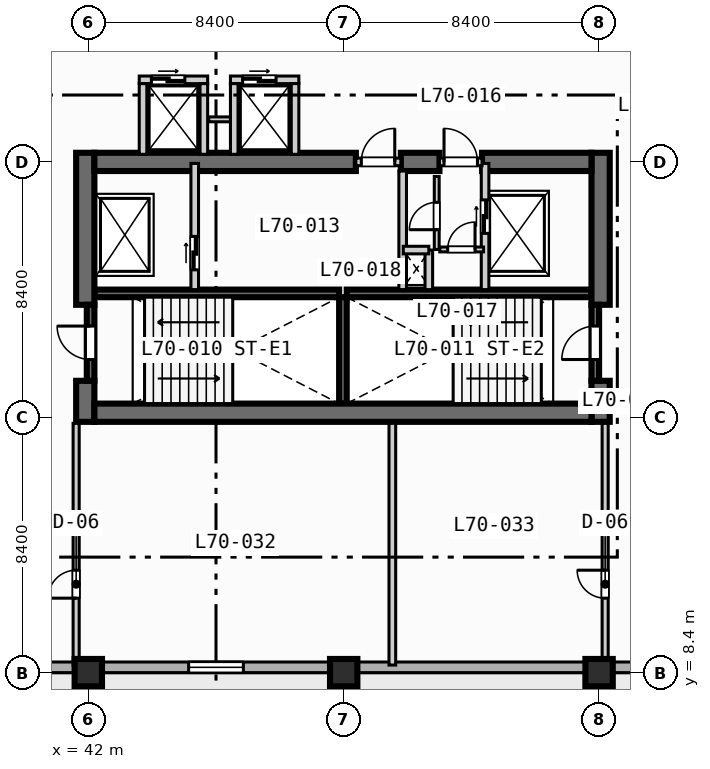
"""IFC4 building model, lengths in metres.
Left out: names, types, materials, properties, quantities, classifications, styles, units other than length and angle.
Written with IfcOpenShell. Run it as: python <this file> out.ifc"""

import sys

from ifc_helpers import new_model, si_unit, direction, frame, frame_2d, origin, origin_2d, place, context, subcontext, project, spatial, rectangle, extrude, element, fill, save


model = new_model("IFC4")
c1 = context("Model", 3, precision=1e-05, world=origin(), true_north=direction((0.0, 1.0)))
c2 = subcontext(c1, "Body", "Model", "MODEL_VIEW")
j1 = project(units=[si_unit("LENGTHUNIT", "METRE"), si_unit("PLANEANGLEUNIT", "RADIAN")], contexts=[c1])
p1 = place(None, origin())
s1 = spatial("IfcSite", under=j1, at=p1, CompositionType="ELEMENT")
p2 = place(p1, origin())
s2 = spatial("IfcBuilding", under=s1, at=p2, CompositionType="ELEMENT")
p3 = place(p2, frame((0.0, 0.0, 282.3)))
s3 = spatial("IfcBuildingStorey", under=s2, at=p3, CompositionType="ELEMENT", Elevation=282.3)
for number, where, z_axis, x_axis in (
    (1, (42.2, 20.875, 0.0), (0.0, 0.0, 1.0), (1.0, 0.0, 0.0)),
    (2, (50.5, 20.875, 0.0), (0.0, 0.0, 1.0), (1.0, 0.0, 0.0)),
):
    element("IfcWall", number, at=place(p3, frame(where, z_axis=z_axis, x_axis=x_axis)), inside=s3, PredefinedType="SOLIDWALL", context=c2, shape_type="SweptSolid", body=[
        extrude(rectangle(XDim=8.05, YDim=0.25, at=frame_2d((4.025, 0.0))), origin(), (0.0, 0.0, 1.0), 3.47),
    ])
p4 = place(p3, frame((50.375, 17.25, 0.0), z_axis=(0.0, 0.0, 1.0), x_axis=(0.0, 1.0, 0.0)))
e3 = element("IfcWall", 3, at=p4, inside=s3, PredefinedType="SOLIDWALL", context=c2, shape_type="SweptSolid", body=[
    extrude(rectangle(XDim=3.5, YDim=0.25, at=frame_2d((1.75, 0.0))), origin(), (0.0, 0.0, 1.0), 3.47),
])
p5 = place(p3, frame((41.9, 16.65, 0.0), z_axis=(0.0, 0.0, 1.0), x_axis=(0.0, 1.0, 0.0)))
e4 = element("IfcWall", 4, at=p5, inside=s3, PredefinedType="SHEAR", context=c2, shape_type="SweptSolid", body=[
    extrude(rectangle(XDim=1.35, YDim=0.6, at=frame_2d((0.675, 0.0))), origin(), (0.0, 0.0, 1.0), 3.47),
])
p6 = place(p3, frame((41.9, 20.5, 0.0), z_axis=(0.0, 0.0, 1.0), x_axis=(0.0, 1.0, 0.0)))
e5 = element("IfcWall", 5, at=p6, inside=s3, PredefinedType="SHEAR", context=c2, shape_type="SweptSolid", body=[
    extrude(rectangle(XDim=5.0, YDim=0.6, at=frame_2d((2.5, 0.0))), origin(), (0.0, 0.0, 1.0), 3.47),
])
p7 = place(p3, frame((58.85, 16.65, 0.0), z_axis=(0.0, 0.0, 1.0), x_axis=(0.0, 1.0, 0.0)))
e6 = element("IfcWall", 6, at=p7, inside=s3, PredefinedType="SHEAR", context=c2, shape_type="SweptSolid", body=[
    extrude(rectangle(XDim=1.35, YDim=0.6, at=frame_2d((0.675, 0.0))), origin(), (0.0, 0.0, 1.0), 3.47),
])
p8 = place(p3, frame((58.85, 20.5, 0.0), z_axis=(0.0, 0.0, 1.0), x_axis=(0.0, 1.0, 0.0)))
e7 = element("IfcWall", 7, at=p8, inside=s3, PredefinedType="SHEAR", context=c2, shape_type="SweptSolid", body=[
    extrude(rectangle(XDim=5.0, YDim=0.6, at=frame_2d((2.5, 0.0))), origin(), (0.0, 0.0, 1.0), 3.47),
])
p9 = place(p3, frame((42.2, 16.95, 0.0), z_axis=(0.0, 0.0, 1.0), x_axis=(1.0, 0.0, 0.0)))
e8 = element("IfcWall", 8, at=p9, inside=s3, PredefinedType="SHEAR", context=c2, shape_type="SweptSolid", body=[
    extrude(rectangle(XDim=16.35, YDim=0.6, at=frame_2d((8.175, 0.0))), origin(), (0.0, 0.0, 1.0), 3.47),
])
p10 = place(p3, frame((42.2, 25.2, 0.0), z_axis=(0.0, 0.0, 1.0), x_axis=(1.0, 0.0, 0.0)))
e9 = element("IfcWall", 9, at=p10, inside=s3, PredefinedType="SHEAR", context=c2, shape_type="SweptSolid", body=[
    extrude(rectangle(XDim=8.6, YDim=0.6, at=frame_2d((4.3, 0.0))), origin(), (0.0, 0.0, 1.0), 3.47),
])
p11 = place(p3, frame((52.28, 25.2, 0.0), z_axis=(0.0, 0.0, 1.0), x_axis=(1.0, 0.0, 0.0)))
e10 = element("IfcWall", 10, at=p11, inside=s3, PredefinedType="SHEAR", context=c2, shape_type="SweptSolid", body=[
    extrude(rectangle(XDim=1.27, YDim=0.6, at=frame_2d((0.635, 0.0))), origin(), (0.0, 0.0, 1.0), 3.47),
])
p12 = place(p3, frame((54.95, 25.2, 0.0), z_axis=(0.0, 0.0, 1.0), x_axis=(1.0, 0.0, 0.0)))
e11 = element("IfcWall", 11, at=p12, inside=s3, PredefinedType="SHEAR", context=c2, shape_type="SweptSolid", body=[
    extrude(rectangle(XDim=3.6, YDim=0.6, at=frame_2d((1.8, 0.0))), origin(), (0.0, 0.0, 1.0), 3.47),
])
for number, where, z_axis, x_axis in (
    (12, (42.0, 8.4, 0.0), (0.0, 0.0, 1.0), (1.0, 0.0, 0.0)),
    (13, (50.4, 8.4, 0.0), (0.0, 0.0, 1.0), (1.0, 0.0, 0.0)),
    (14, (58.8, 8.4, 0.0), (0.0, 0.0, 1.0), (1.0, 0.0, 0.0)),
):
    element("IfcColumn", number, at=place(p3, frame(where, z_axis=z_axis, x_axis=x_axis)), inside=s3, PredefinedType="COLUMN", context=c2, shape_type="SweptSolid", body=[
        extrude(rectangle(XDim=0.9, YDim=0.9, at=origin_2d()), origin(), (0.0, 0.0, 1.0), 3.7),
    ])
p13 = place(p3, frame((72.425, 8.575, 0.0), z_axis=(0.0, 0.0, 1.0), x_axis=(-1.0, 0.0, 0.0)))
e15 = element("IfcWall", 15, at=p13, inside=s3, PredefinedType="STANDARD", context=c2, shape_type="SweptSolid", body=[
    extrude(rectangle(XDim=60.85, YDim=0.35, at=frame_2d((30.425, 0.0))), origin(), (0.0, 0.0, 1.0), 3.47),
])
p14 = place(p13, frame((41.825, 0.0, 0.0)))
e16 = element("IfcOpeningElement", 16, at=p14, cuts=e15, PredefinedType="OPENING", context=c2, shape_type="SweptSolid", body=[
    extrude(rectangle(XDim=1.4, YDim=2.2, at=frame_2d((0.7, 1.1))), frame((0.0, 0.185, 0.0), z_axis=(0.0, -1.0, 0.0), x_axis=(1.0, 0.0, 0.0)), (0.0, 0.0, 1.0), 0.37),
])
p15 = place(p13, frame((50.225, 0.0, 0.85)))
e17 = element("IfcOpeningElement", 17, at=p15, cuts=e15, PredefinedType="OPENING", context=c2, shape_type="SweptSolid", body=[
    extrude(rectangle(XDim=2.4, YDim=1.95, at=frame_2d((1.2, 0.975))), frame((0.0, 0.185, 0.0), z_axis=(0.0, -1.0, 0.0), x_axis=(1.0, 0.0, 0.0)), (0.0, 0.0, 1.0), 0.37),
])
p16 = place(p13, frame((33.425, 0.0, 0.85)))
e18 = element("IfcOpeningElement", 18, at=p16, cuts=e15, PredefinedType="OPENING", context=c2, shape_type="SweptSolid", body=[
    extrude(rectangle(XDim=2.4, YDim=1.95, at=frame_2d((1.2, 0.975))), frame((0.0, 0.185, 0.0), z_axis=(0.0, -1.0, 0.0), x_axis=(1.0, 0.0, 0.0)), (0.0, 0.0, 1.0), 0.37),
])
p17 = place(p13, frame((25.325, 0.0, 0.85)))
e19 = element("IfcOpeningElement", 19, at=p17, cuts=e15, PredefinedType="OPENING", context=c2, shape_type="SweptSolid", body=[
    extrude(rectangle(XDim=1.8, YDim=1.8, at=frame_2d((0.9, 0.9))), frame((0.0, 0.185, 0.0), z_axis=(0.0, -1.0, 0.0), x_axis=(1.0, 0.0, 0.0)), (0.0, 0.0, 1.0), 0.37),
])
p18 = place(p13, frame((56.975, 0.0, 0.85)))
e20 = element("IfcOpeningElement", 20, at=p18, cuts=e15, PredefinedType="OPENING", context=c2, shape_type="SweptSolid", body=[
    extrude(rectangle(XDim=1.8, YDim=1.8, at=frame_2d((0.9, 0.9))), frame((0.0, 0.185, 0.0), z_axis=(0.0, -1.0, 0.0), x_axis=(1.0, 0.0, 0.0)), (0.0, 0.0, 1.0), 0.37),
])
p19 = place(p13, frame((44.725, 0.0, 0.85)))
e21 = element("IfcOpeningElement", 21, at=p19, cuts=e15, PredefinedType="OPENING", context=c2, shape_type="SweptSolid", body=[
    extrude(rectangle(XDim=1.8, YDim=1.8, at=frame_2d((0.9, 0.9))), frame((0.0, 0.185, 0.0), z_axis=(0.0, -1.0, 0.0), x_axis=(1.0, 0.0, 0.0)), (0.0, 0.0, 1.0), 0.37),
])
p20 = place(p3, frame((42.075, 18.0, 0.0), z_axis=(0.0, 0.0, 1.0), x_axis=(0.0, 1.0, 0.0)))
e22 = element("IfcWall", 22, at=p20, inside=s3, PredefinedType="SOLIDWALL", context=c2, shape_type="SweptSolid", body=[
    extrude(rectangle(XDim=2.5, YDim=0.25, at=frame_2d((1.25, 0.0))), origin(), (0.0, 0.0, 1.0), 3.47),
])
p21 = place(p20, frame((0.7, 0.0, 0.0)))
e23 = element("IfcOpeningElement", 23, at=p21, cuts=e22, PredefinedType="OPENING", context=c2, shape_type="SweptSolid", body=[
    extrude(rectangle(XDim=1.1, YDim=2.15, at=frame_2d((0.55, 1.075))), frame((0.0, 0.135, 0.0), z_axis=(0.0, -1.0, 0.0), x_axis=(1.0, 0.0, 0.0)), (0.0, 0.0, 1.0), 0.27),
])
p22 = place(p3, frame((58.675, 18.0, 0.0), z_axis=(0.0, 0.0, 1.0), x_axis=(0.0, 1.0, 0.0)))
e24 = element("IfcWall", 24, at=p22, inside=s3, PredefinedType="SOLIDWALL", context=c2, shape_type="SweptSolid", body=[
    extrude(rectangle(XDim=2.5, YDim=0.25, at=frame_2d((1.25, 0.0))), origin(), (0.0, 0.0, 1.0), 3.47),
])
p23 = place(p22, frame((0.7, 0.0, 0.0)))
e25 = element("IfcOpeningElement", 25, at=p23, cuts=e24, PredefinedType="OPENING", context=c2, shape_type="SweptSolid", body=[
    extrude(rectangle(XDim=1.1, YDim=2.15, at=frame_2d((0.55, 1.075))), frame((0.0, 0.135, 0.0), z_axis=(0.0, -1.0, 0.0), x_axis=(1.0, 0.0, 0.0)), (0.0, 0.0, 1.0), 0.27),
])
p24 = place(p3, frame((45.5, 21.0, 0.0), z_axis=(0.0, 0.0, 1.0), x_axis=(0.0, 1.0, 0.0)))
e26 = element("IfcWall", 26, at=p24, inside=s3, PredefinedType="SOLIDWALL", context=c2, shape_type="SweptSolid", body=[
    extrude(rectangle(XDim=4.15, YDim=0.25, at=frame_2d((2.075, 0.0))), origin(), (0.0, 0.0, 1.0), 3.47),
])
p25 = place(p24, frame((0.65, 0.0, 0.0)))
e27 = element("IfcOpeningElement", 27, at=p25, cuts=e26, PredefinedType="OPENING", context=c2, shape_type="SweptSolid", body=[
    extrude(rectangle(XDim=1.1, YDim=2.15, at=frame_2d((0.55, 1.075))), frame((0.0, 0.135, 0.0), z_axis=(0.0, -1.0, 0.0), x_axis=(1.0, 0.0, 0.0)), (0.0, 0.0, 1.0), 0.27),
])
p26 = place(p3, frame((50.8, 25.2, 0.0), z_axis=(0.0, 0.0, 1.0), x_axis=(1.0, 0.0, 0.0)))
e28 = element("IfcWall", 28, at=p26, inside=s3, PredefinedType="SOLIDWALL", context=c2, shape_type="SweptSolid", body=[
    extrude(rectangle(XDim=1.48, YDim=0.25, at=frame_2d((0.74, 0.0))), origin(), (0.0, 0.0, 1.0), 3.47),
])
p27 = place(p26, frame((0.18, 0.0, 0.0)))
e29 = element("IfcOpeningElement", 29, at=p27, cuts=e28, PredefinedType="OPENING", context=c2, shape_type="SweptSolid", body=[
    extrude(rectangle(XDim=1.1, YDim=2.15, at=frame_2d((0.55, 1.075))), frame((0.0, 0.135, 0.0), z_axis=(0.0, -1.0, 0.0), x_axis=(1.0, 0.0, 0.0)), (0.0, 0.0, 1.0), 0.27),
])
p28 = place(p3, frame((52.34, 21.0, 0.0), z_axis=(0.0, 0.0, 1.0), x_axis=(0.0, 1.0, 0.0)))
e30 = element("IfcWall", 30, at=p28, inside=s3, PredefinedType="SOLIDWALL", context=c2, shape_type="SweptSolid", body=[
    extrude(rectangle(XDim=3.9, YDim=0.25, at=frame_2d((1.95, 0.0))), origin(), (0.0, 0.0, 1.0), 3.47),
])
p29 = place(p3, frame((55.05, 21.0, 0.0), z_axis=(0.0, 0.0, 1.0), x_axis=(0.0, 1.0, 0.0)))
e31 = element("IfcWall", 31, at=p29, inside=s3, PredefinedType="SOLIDWALL", context=c2, shape_type="SweptSolid", body=[
    extrude(rectangle(XDim=4.15, YDim=0.25, at=frame_2d((2.075, 0.0))), origin(), (0.0, 0.0, 1.0), 3.47),
])
p30 = place(p29, frame((1.85, 0.0, 0.0)))
e32 = element("IfcOpeningElement", 32, at=p30, cuts=e31, PredefinedType="OPENING", context=c2, shape_type="SweptSolid", body=[
    extrude(rectangle(XDim=1.1, YDim=2.15, at=frame_2d((0.55, 1.075))), frame((0.0, 0.135, 0.0), z_axis=(0.0, -1.0, 0.0), x_axis=(1.0, 0.0, 0.0)), (0.0, 0.0, 1.0), 0.27),
])
p31 = place(p3, frame((53.55, 25.2, 0.0), z_axis=(0.0, 0.0, 1.0), x_axis=(1.0, 0.0, 0.0)))
e33 = element("IfcWall", 33, at=p31, inside=s3, PredefinedType="SOLIDWALL", context=c2, shape_type="SweptSolid", body=[
    extrude(rectangle(XDim=1.4, YDim=0.25, at=frame_2d((0.7, 0.0))), origin(), (0.0, 0.0, 1.0), 3.47),
])
p32 = place(p31, frame((0.15, 0.0, 0.0)))
e34 = element("IfcOpeningElement", 34, at=p32, cuts=e33, PredefinedType="OPENING", context=c2, shape_type="SweptSolid", body=[
    extrude(rectangle(XDim=1.1, YDim=2.15, at=frame_2d((0.55, 1.075))), frame((0.0, 0.135, 0.0), z_axis=(0.0, -1.0, 0.0), x_axis=(1.0, 0.0, 0.0)), (0.0, 0.0, 1.0), 0.27),
])
p33 = place(p3, frame((53.2, 21.0, 0.0), z_axis=(0.0, 0.0, 1.0), x_axis=(0.0, 1.0, 0.0)))
e35 = element("IfcWall", 35, at=p33, inside=s3, PredefinedType="SOLIDWALL", context=c2, shape_type="SweptSolid", body=[
    extrude(rectangle(XDim=1.3, YDim=0.25, at=frame_2d((0.65, 0.0))), origin(), (0.0, 0.0, 1.0), 3.47),
])
p34 = place(p3, frame((52.36, 22.3, 0.0), z_axis=(0.0, 0.0, 1.0), x_axis=(1.0, 0.0, 0.0)))
e36 = element("IfcWall", 36, at=p34, inside=s3, PredefinedType="SOLIDWALL", context=c2, shape_type="SweptSolid", body=[
    extrude(rectangle(XDim=0.84, YDim=0.25, at=frame_2d((0.42, 0.0))), origin(), (0.0, 0.0, 1.0), 3.47),
])
p35 = place(p3, frame((53.56, 22.32, 0.0), z_axis=(0.0, 0.0, 1.0), x_axis=(1.0, 0.0, 0.0)))
e37 = element("IfcWall", 37, at=p35, inside=s3, PredefinedType="PARTITIONING", context=c2, shape_type="SweptSolid", body=[
    extrude(rectangle(XDim=1.44, YDim=0.16, at=frame_2d((0.72, 0.0))), origin(), (0.0, 0.0, 1.0), 3.47),
])
p36 = place(p35, frame((0.26, 0.0, 0.0)))
e38 = element("IfcOpeningElement", 38, at=p36, cuts=e37, PredefinedType="OPENING", context=c2, shape_type="SweptSolid", body=[
    extrude(rectangle(XDim=0.9, YDim=2.1, at=frame_2d((0.45, 1.05))), frame((0.0, 0.09, 0.0), z_axis=(0.0, -1.0, 0.0), x_axis=(1.0, 0.0, 0.0)), (0.0, 0.0, 1.0), 0.18),
])
p37 = place(p3, frame((53.46, 22.32, 0.0), z_axis=(0.0, 0.0, 1.0), x_axis=(0.0, 1.0, 0.0)))
e39 = element("IfcWall", 39, at=p37, inside=s3, PredefinedType="PARTITIONING", context=c2, shape_type="SweptSolid", body=[
    extrude(rectangle(XDim=2.4, YDim=0.16, at=frame_2d((1.2, 0.0))), origin(), (0.0, 0.0, 1.0), 3.47),
])
p38 = place(p37, frame((0.65, 0.0, 0.0)))
e40 = element("IfcOpeningElement", 40, at=p38, cuts=e39, PredefinedType="OPENING", context=c2, shape_type="SweptSolid", body=[
    extrude(rectangle(XDim=0.9, YDim=2.1, at=frame_2d((0.45, 1.05))), frame((0.0, 0.09, 0.0), z_axis=(0.0, -1.0, 0.0), x_axis=(1.0, 0.0, 0.0)), (0.0, 0.0, 1.0), 0.18),
])
p39 = place(p3, frame((43.675, 27.9, 0.0), z_axis=(0.0, 0.0, 1.0), x_axis=(1.0, 0.0, 0.0)))
e41 = element("IfcWall", 41, at=p39, inside=s3, PredefinedType="SOLIDWALL", context=c2, shape_type="SweptSolid", body=[
    extrude(rectangle(XDim=2.25, YDim=0.25, at=frame_2d((1.125, 0.0))), origin(), (0.0, 0.0, 1.0), 3.47),
])
p40 = place(p39, frame((0.4, 0.0, 0.0)))
e42 = element("IfcOpeningElement", 42, at=p40, cuts=e41, PredefinedType="OPENING", context=c2, shape_type="SweptSolid", body=[
    extrude(rectangle(XDim=1.1, YDim=2.15, at=frame_2d((0.55, 1.075))), frame((0.0, 0.135, 0.0), z_axis=(0.0, -1.0, 0.0), x_axis=(1.0, 0.0, 0.0)), (0.0, 0.0, 1.0), 0.27),
])
for number, where, z_axis, x_axis in (
    (43, (43.8, 25.45, 0.0), (0.0, 0.0, 1.0), (0.0, 1.0, 0.0)),
    (44, (45.8, 25.45, 0.0), (0.0, 0.0, 1.0), (0.0, 1.0, 0.0)),
):
    element("IfcWall", number, at=place(p3, frame(where, z_axis=z_axis, x_axis=x_axis)), inside=s3, PredefinedType="SOLIDWALL", context=c2, shape_type="SweptSolid", body=[
        extrude(rectangle(XDim=2.325, YDim=0.25, at=frame_2d((1.163, 0.0))), origin(), (0.0, 0.0, 1.0), 3.47),
    ])
p41 = place(p3, frame((45.96, 26.6, 0.0), z_axis=(0.0, 0.0, 1.0), x_axis=(1.0, 0.0, 0.0)))
e45 = element("IfcWall", 45, at=p41, inside=s3, PredefinedType="PARTITIONING", context=c2, shape_type="SweptSolid", body=[
    extrude(rectangle(XDim=0.88, YDim=0.16, at=frame_2d((0.44, 0.0))), origin(), (0.0, 0.0, 1.0), 3.47),
])
p42 = place(p3, frame((46.675, 27.9, 0.0), z_axis=(0.0, 0.0, 1.0), x_axis=(1.0, 0.0, 0.0)))
e46 = element("IfcWall", 46, at=p42, inside=s3, PredefinedType="SOLIDWALL", context=c2, shape_type="SweptSolid", body=[
    extrude(rectangle(XDim=2.25, YDim=0.25, at=frame_2d((1.125, 0.0))), origin(), (0.0, 0.0, 1.0), 3.47),
])
p43 = place(p42, frame((0.4, 0.0, 0.0)))
e47 = element("IfcOpeningElement", 47, at=p43, cuts=e46, PredefinedType="OPENING", context=c2, shape_type="SweptSolid", body=[
    extrude(rectangle(XDim=1.1, YDim=2.15, at=frame_2d((0.55, 1.075))), frame((0.0, 0.135, 0.0), z_axis=(0.0, -1.0, 0.0), x_axis=(1.0, 0.0, 0.0)), (0.0, 0.0, 1.0), 0.27),
])
for number, where, z_axis, x_axis in (
    (48, (46.8, 25.45, 0.0), (0.0, 0.0, 1.0), (0.0, 1.0, 0.0)),
    (49, (48.8, 25.45, 0.0), (0.0, 0.0, 1.0), (0.0, 1.0, 0.0)),
):
    element("IfcWall", number, at=place(p3, frame(where, z_axis=z_axis, x_axis=x_axis)), inside=s3, PredefinedType="SOLIDWALL", context=c2, shape_type="SweptSolid", body=[
        extrude(rectangle(XDim=2.325, YDim=0.25, at=frame_2d((1.163, 0.0))), origin(), (0.0, 0.0, 1.0), 3.47),
    ])
p44 = place(p3, frame((41.6, 8.65, 0.0), z_axis=(0.0, 0.0, 1.0), x_axis=(0.0, 1.0, 0.0)))
e50 = element("IfcWall", 50, at=p44, inside=s3, PredefinedType="PARTITIONING", context=c2, shape_type="SweptSolid", body=[
    extrude(rectangle(XDim=7.95, YDim=0.2, at=frame_2d((3.975, 0.0))), origin(), (0.0, 0.0, 1.0), 3.47),
])
p45 = place(p44, frame((2.2, 0.0, 0.0)))
e51 = element("IfcOpeningElement", 51, at=p45, cuts=e50, PredefinedType="OPENING", context=c2, shape_type="SweptSolid", body=[
    extrude(rectangle(XDim=0.92, YDim=2.1, at=frame_2d((0.46, 1.05))), frame((0.0, 0.11, 0.0), z_axis=(0.0, -1.0, 0.0), x_axis=(1.0, 0.0, 0.0)), (0.0, 0.0, 1.0), 0.22),
])
p46 = place(p3, frame((59.0, 8.65, 0.0), z_axis=(0.0, 0.0, 1.0), x_axis=(0.0, 1.0, 0.0)))
e52 = element("IfcWall", 52, at=p46, inside=s3, PredefinedType="PARTITIONING", context=c2, shape_type="SweptSolid", body=[
    extrude(rectangle(XDim=7.95, YDim=0.2, at=frame_2d((3.975, 0.0))), origin(), (0.0, 0.0, 1.0), 3.16),
])
p47 = place(p46, frame((2.2, 0.0, 0.0)))
e53 = element("IfcOpeningElement", 53, at=p47, cuts=e52, PredefinedType="OPENING", context=c2, shape_type="SweptSolid", body=[
    extrude(rectangle(XDim=0.92, YDim=2.1, at=frame_2d((0.46, 1.05))), frame((0.0, 0.11, 0.0), z_axis=(0.0, -1.0, 0.0), x_axis=(1.0, 0.0, 0.0)), (0.0, 0.0, 1.0), 0.22),
])
p48 = place(p3, frame((52.0, 8.65, 0.0), z_axis=(0.0, 0.0, 1.0), x_axis=(0.0, 1.0, 0.0)))
e54 = element("IfcWall", 54, at=p48, inside=s3, PredefinedType="PARTITIONING", context=c2, shape_type="SweptSolid", body=[
    extrude(rectangle(XDim=7.95, YDim=0.22, at=frame_2d((3.975, 0.0))), origin(), (0.0, 0.0, 1.0), 3.47),
])
p49 = place(p17, origin())
e55 = element("IfcWindow", 55, at=p49, inside=s3, PartitioningType="SINGLE_PANEL", PredefinedType="WINDOW", context=c2, shape_type="SweptSolid", body=[
    extrude(rectangle(XDim=1.8, YDim=1.8, at=frame_2d((0.9, 0.9))), frame((0.0, 0.03, 0.0), z_axis=(0.0, -1.0, 0.0), x_axis=(1.0, 0.0, 0.0)), (0.0, 0.0, 1.0), 0.06),
])
fill(e19, e55)
p50 = place(p21, origin())
e56 = element("IfcDoor", 56, at=p50, inside=s3, OperationType="SINGLE_SWING_RIGHT", PredefinedType="DOOR", context=c2, shape_type="SweptSolid", body=[
    extrude(rectangle(XDim=1.1, YDim=2.15, at=frame_2d((0.55, 1.075))), frame((0.0, 0.025, 0.0), z_axis=(0.0, -1.0, 0.0), x_axis=(1.0, 0.0, 0.0)), (0.0, 0.0, 1.0), 0.05),
])
fill(e23, e56)
p51 = place(p23, origin())
e57 = element("IfcDoor", 57, at=p51, inside=s3, OperationType="SINGLE_SWING_LEFT", PredefinedType="DOOR", context=c2, shape_type="SweptSolid", body=[
    extrude(rectangle(XDim=1.1, YDim=2.15, at=frame_2d((0.55, 1.075))), frame((0.0, 0.025, 0.0), z_axis=(0.0, -1.0, 0.0), x_axis=(1.0, 0.0, 0.0)), (0.0, 0.0, 1.0), 0.05),
])
fill(e25, e57)
p52 = place(p25, origin())
e58 = element("IfcDoor", 58, at=p52, inside=s3, OperationType="SLIDING_TO_LEFT", PredefinedType="DOOR", context=c2, shape_type="SweptSolid", body=[
    extrude(rectangle(XDim=1.1, YDim=2.15, at=frame_2d((0.55, 1.075))), frame((0.0, 0.025, 0.0), z_axis=(0.0, -1.0, 0.0), x_axis=(1.0, 0.0, 0.0)), (0.0, 0.0, 1.0), 0.05),
])
fill(e27, e58)
p53 = place(p27, origin())
e59 = element("IfcDoor", 59, at=p53, inside=s3, OperationType="SINGLE_SWING_RIGHT", PredefinedType="DOOR", context=c2, shape_type="SweptSolid", body=[
    extrude(rectangle(XDim=1.1, YDim=2.15, at=frame_2d((0.55, 1.075))), frame((0.0, 0.025, 0.0), z_axis=(0.0, -1.0, 0.0), x_axis=(1.0, 0.0, 0.0)), (0.0, 0.0, 1.0), 0.05),
])
fill(e29, e59)
p54 = place(p30, origin())
e60 = element("IfcDoor", 60, at=p54, inside=s3, OperationType="SLIDING_TO_LEFT", PredefinedType="DOOR", context=c2, shape_type="SweptSolid", body=[
    extrude(rectangle(XDim=1.1, YDim=2.15, at=frame_2d((0.55, 1.075))), frame((0.0, 0.025, 0.0), z_axis=(0.0, -1.0, 0.0), x_axis=(1.0, 0.0, 0.0)), (0.0, 0.0, 1.0), 0.05),
])
fill(e32, e60)
p55 = place(p32, origin())
e61 = element("IfcDoor", 61, at=p55, inside=s3, OperationType="SINGLE_SWING_LEFT", PredefinedType="DOOR", context=c2, shape_type="SweptSolid", body=[
    extrude(rectangle(XDim=1.1, YDim=2.15, at=frame_2d((0.55, 1.075))), frame((0.0, 0.025, 0.0), z_axis=(0.0, -1.0, 0.0), x_axis=(1.0, 0.0, 0.0)), (0.0, 0.0, 1.0), 0.05),
])
fill(e34, e61)
p56 = place(p36, origin())
e62 = element("IfcDoor", 62, at=p56, inside=s3, OperationType="SINGLE_SWING_RIGHT", PredefinedType="DOOR", context=c2, shape_type="SweptSolid", body=[
    extrude(rectangle(XDim=0.9, YDim=2.1, at=frame_2d((0.45, 1.05))), frame((0.0, 0.025, 0.0), z_axis=(0.0, -1.0, 0.0), x_axis=(1.0, 0.0, 0.0)), (0.0, 0.0, 1.0), 0.05),
])
fill(e38, e62)
p57 = place(p38, origin())
e63 = element("IfcDoor", 63, at=p57, inside=s3, OperationType="SINGLE_SWING_LEFT", PredefinedType="DOOR", context=c2, shape_type="SweptSolid", body=[
    extrude(rectangle(XDim=0.9, YDim=2.1, at=frame_2d((0.45, 1.05))), frame((0.0, 0.025, 0.0), z_axis=(0.0, -1.0, 0.0), x_axis=(1.0, 0.0, 0.0)), (0.0, 0.0, 1.0), 0.05),
])
fill(e40, e63)
p58 = place(p40, origin())
e64 = element("IfcDoor", 64, at=p58, inside=s3, OperationType="SLIDING_TO_LEFT", PredefinedType="DOOR", context=c2, shape_type="SweptSolid", body=[
    extrude(rectangle(XDim=1.1, YDim=2.15, at=frame_2d((0.55, 1.075))), frame((0.0, 0.025, 0.0), z_axis=(0.0, -1.0, 0.0), x_axis=(1.0, 0.0, 0.0)), (0.0, 0.0, 1.0), 0.05),
])
fill(e42, e64)
p59 = place(p43, origin())
e65 = element("IfcDoor", 65, at=p59, inside=s3, OperationType="SLIDING_TO_LEFT", PredefinedType="DOOR", context=c2, shape_type="SweptSolid", body=[
    extrude(rectangle(XDim=1.1, YDim=2.15, at=frame_2d((0.55, 1.075))), frame((0.0, 0.025, 0.0), z_axis=(0.0, -1.0, 0.0), x_axis=(1.0, 0.0, 0.0)), (0.0, 0.0, 1.0), 0.05),
])
fill(e47, e65)
p60 = place(p45, origin())
e66 = element("IfcDoor", 66, at=p60, inside=s3, OperationType="SINGLE_SWING_LEFT", PredefinedType="DOOR", context=c2, shape_type="SweptSolid", body=[
    extrude(rectangle(XDim=0.92, YDim=2.1, at=frame_2d((0.46, 1.05))), frame((0.0, 0.025, 0.0), z_axis=(0.0, -1.0, 0.0), x_axis=(1.0, 0.0, 0.0)), (0.0, 0.0, 1.0), 0.05),
])
fill(e51, e66)
p61 = place(p47, origin())
e67 = element("IfcDoor", 67, at=p61, inside=s3, OperationType="SINGLE_SWING_RIGHT", PredefinedType="DOOR", context=c2, shape_type="SweptSolid", body=[
    extrude(rectangle(XDim=0.92, YDim=2.1, at=frame_2d((0.46, 1.05))), frame((0.0, 0.025, 0.0), z_axis=(0.0, -1.0, 0.0), x_axis=(1.0, 0.0, 0.0)), (0.0, 0.0, 1.0), 0.05),
])
fill(e53, e67)
save(model, sys.argv[1])
